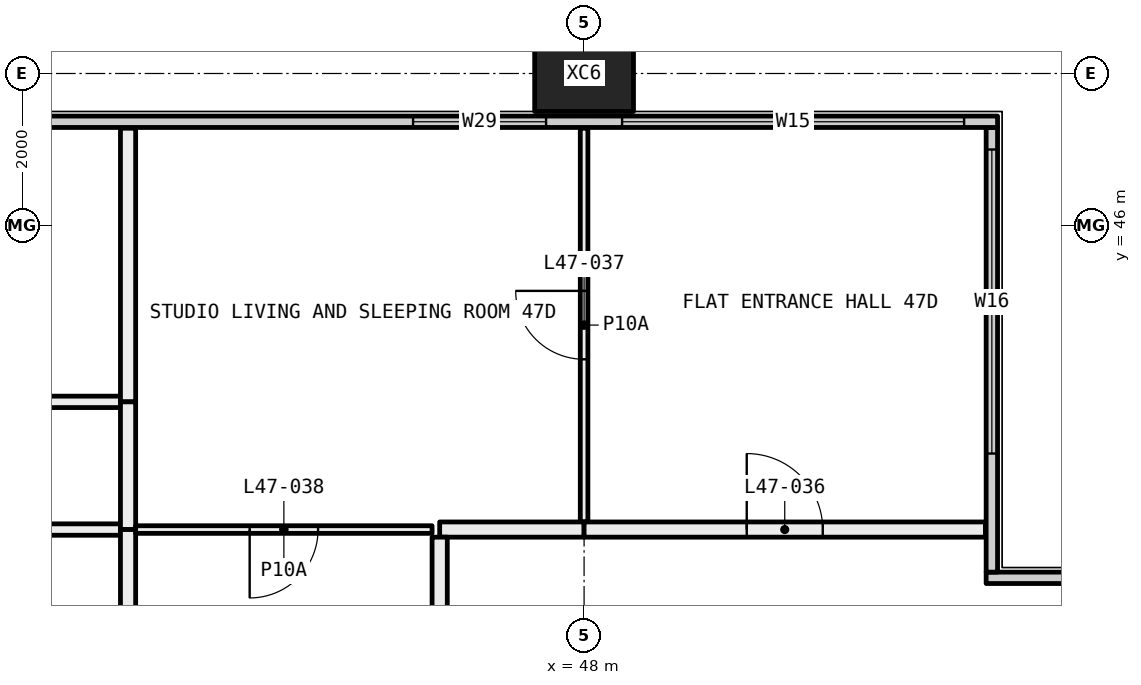
"""IFC4 building model, lengths in metres.
Left out: names, types, materials, properties, quantities, classifications, styles, units other than length and angle.
Written with IfcOpenShell. Run it as: python <this file> out.ifc"""

import sys

from ifc_helpers import new_model, si_unit, direction, frame, frame_2d, origin, origin_2d, place, context, subcontext, project, spatial, rectangle, hollow_rectangle, extrude, element, fill, save


model = new_model("IFC4")
c1 = context("Model", 3, precision=1e-05, world=origin(), true_north=direction((0.0, 1.0)))
c2 = subcontext(c1, "Body", "Model", "MODEL_VIEW")
j1 = project(units=[si_unit("LENGTHUNIT", "METRE"), si_unit("PLANEANGLEUNIT", "RADIAN")], contexts=[c1])
p1 = place(None, origin())
s1 = spatial("IfcSite", under=j1, at=p1, CompositionType="ELEMENT")
p2 = place(p1, origin())
s2 = spatial("IfcBuilding", under=s1, at=p2, CompositionType="ELEMENT")
p3 = place(p2, frame((0.0, 0.0, 178.95)))
s3 = spatial("IfcBuildingStorey", under=s2, at=p3, CompositionType="ELEMENT", Elevation=178.95)
p4 = place(p3, frame((48.0, 48.0, -0.4), z_axis=(0.0, 0.0, 1.0), x_axis=(1.0, 0.0, 0.0)))
e1 = element("IfcColumn", 1, at=p4, inside=s3, PredefinedType="COLUMN", context=c2, shape_type="SweptSolid", body=[
    extrude(hollow_rectangle(XDim=1.3, YDim=1.0, WallThickness=0.05, at=origin_2d()), origin(), (0.0, 0.0, 1.0), 3.45),
])
p5 = place(p3, frame((53.29, 41.365, 0.0), z_axis=(0.0, 0.0, 1.0), x_axis=(1.0, 0.0, 0.0)))
e2 = element("IfcWall", 2, at=p5, inside=s3, PredefinedType="ELEMENTEDWALL", context=c2, shape_type="SweptSolid", body=[
    extrude(rectangle(XDim=6.15, YDim=0.15, at=frame_2d((3.075, 0.0))), origin(), (0.0, 0.0, 1.0), 3.05),
])
p6 = place(p5, frame((1.71, 0.0, 0.45)))
e3 = element("IfcOpeningElement", 3, at=p6, cuts=e2, PredefinedType="OPENING", context=c2, shape_type="SweptSolid", body=[
    extrude(rectangle(XDim=4.0, YDim=2.55, at=frame_2d((2.0, 1.275))), frame((0.0, 0.085, 0.0), z_axis=(0.0, -1.0, 0.0), x_axis=(1.0, 0.0, 0.0)), (0.0, 0.0, 1.0), 0.17),
])
p7 = place(p3, frame((53.365, 41.44, 0.0), z_axis=(0.0, 0.0, 1.0), x_axis=(0.0, 1.0, 0.0)))
e4 = element("IfcWall", 4, at=p7, inside=s3, PredefinedType="ELEMENTEDWALL", context=c2, shape_type="SweptSolid", body=[
    extrude(rectangle(XDim=5.85, YDim=0.15, at=frame_2d((2.925, 0.0))), origin(), (0.0, 0.0, 1.0), 3.05),
])
p8 = place(p7, frame((1.56, 0.0, 0.45)))
e5 = element("IfcOpeningElement", 5, at=p8, cuts=e4, PredefinedType="OPENING", context=c2, shape_type="SweptSolid", body=[
    extrude(rectangle(XDim=4.0, YDim=2.55, at=frame_2d((2.0, 1.275))), frame((0.0, 0.085, 0.0), z_axis=(0.0, -1.0, 0.0), x_axis=(1.0, 0.0, 0.0)), (0.0, 0.0, 1.0), 0.17),
])
p9 = place(p3, frame((6.56, 47.365, 0.0), z_axis=(0.0, 0.0, 1.0), x_axis=(1.0, 0.0, 0.0)))
e6 = element("IfcWall", 6, at=p9, inside=s3, PredefinedType="ELEMENTEDWALL", context=c2, shape_type="SweptSolid", body=[
    extrude(rectangle(XDim=46.88, YDim=0.15, at=frame_2d((23.44, 0.0))), origin(), (0.0, 0.0, 1.0), 3.05),
])
p10 = place(p9, frame((0.44, 0.0, 0.45)))
e7 = element("IfcOpeningElement", 7, at=p10, cuts=e6, PredefinedType="OPENING", context=c2, shape_type="SweptSolid", body=[
    extrude(rectangle(XDim=4.5, YDim=2.55, at=frame_2d((2.25, 1.275))), frame((0.0, 0.085, 0.0), z_axis=(0.0, -1.0, 0.0), x_axis=(1.0, 0.0, 0.0)), (0.0, 0.0, 1.0), 0.17),
])
p11 = place(p9, frame((5.94, 0.0, 0.45)))
e8 = element("IfcOpeningElement", 8, at=p11, cuts=e6, PredefinedType="OPENING", context=c2, shape_type="SweptSolid", body=[
    extrude(rectangle(XDim=1.75, YDim=2.55, at=frame_2d((0.875, 1.275))), frame((0.0, 0.085, 0.0), z_axis=(0.0, -1.0, 0.0), x_axis=(1.0, 0.0, 0.0)), (0.0, 0.0, 1.0), 0.17),
])
p12 = place(p9, frame((15.19, 0.0, 0.45)))
e9 = element("IfcOpeningElement", 9, at=p12, cuts=e6, PredefinedType="OPENING", context=c2, shape_type="SweptSolid", body=[
    extrude(rectangle(XDim=1.75, YDim=2.55, at=frame_2d((0.875, 1.275))), frame((0.0, 0.085, 0.0), z_axis=(0.0, -1.0, 0.0), x_axis=(1.0, 0.0, 0.0)), (0.0, 0.0, 1.0), 0.17),
])
p13 = place(p9, frame((17.94, 0.0, 0.45)))
e10 = element("IfcOpeningElement", 10, at=p13, cuts=e6, PredefinedType="OPENING", context=c2, shape_type="SweptSolid", body=[
    extrude(rectangle(XDim=1.75, YDim=2.55, at=frame_2d((0.875, 1.275))), frame((0.0, 0.085, 0.0), z_axis=(0.0, -1.0, 0.0), x_axis=(1.0, 0.0, 0.0)), (0.0, 0.0, 1.0), 0.17),
])
p14 = place(p9, frame((27.19, 0.0, 0.45)))
e11 = element("IfcOpeningElement", 11, at=p14, cuts=e6, PredefinedType="OPENING", context=c2, shape_type="SweptSolid", body=[
    extrude(rectangle(XDim=1.75, YDim=2.55, at=frame_2d((0.875, 1.275))), frame((0.0, 0.085, 0.0), z_axis=(0.0, -1.0, 0.0), x_axis=(1.0, 0.0, 0.0)), (0.0, 0.0, 1.0), 0.17),
])
p15 = place(p9, frame((29.94, 0.0, 0.45)))
e12 = element("IfcOpeningElement", 12, at=p15, cuts=e6, PredefinedType="OPENING", context=c2, shape_type="SweptSolid", body=[
    extrude(rectangle(XDim=1.75, YDim=2.55, at=frame_2d((0.875, 1.275))), frame((0.0, 0.085, 0.0), z_axis=(0.0, -1.0, 0.0), x_axis=(1.0, 0.0, 0.0)), (0.0, 0.0, 1.0), 0.17),
])
p16 = place(p9, frame((39.19, 0.0, 0.45)))
e13 = element("IfcOpeningElement", 13, at=p16, cuts=e6, PredefinedType="OPENING", context=c2, shape_type="SweptSolid", body=[
    extrude(rectangle(XDim=1.75, YDim=2.55, at=frame_2d((0.875, 1.275))), frame((0.0, 0.085, 0.0), z_axis=(0.0, -1.0, 0.0), x_axis=(1.0, 0.0, 0.0)), (0.0, 0.0, 1.0), 0.17),
])
p17 = place(p9, frame((41.94, 0.0, 0.45)))
e14 = element("IfcOpeningElement", 14, at=p17, cuts=e6, PredefinedType="OPENING", context=c2, shape_type="SweptSolid", body=[
    extrude(rectangle(XDim=4.5, YDim=2.55, at=frame_2d((2.25, 1.275))), frame((0.0, 0.085, 0.0), z_axis=(0.0, -1.0, 0.0), x_axis=(1.0, 0.0, 0.0)), (0.0, 0.0, 1.0), 0.17),
])
p18 = place(p3, frame((36.075, 43.68, 0.0), z_axis=(0.0, 0.0, 1.0), x_axis=(1.0, 0.0, 0.0)))
e15 = element("IfcWall", 15, at=p18, inside=s3, PredefinedType="PARTITIONING", context=c2, shape_type="SweptSolid", body=[
    extrude(rectangle(XDim=5.825, YDim=0.15, at=frame_2d((2.913, 0.0))), origin(), (0.0, 0.0, 1.0), 2.45),
])
p19 = place(p3, frame((42.0, 43.68, 0.0), z_axis=(0.0, 0.0, 1.0), x_axis=(0.0, 1.0, 0.0)))
e16 = element("IfcWall", 16, at=p19, inside=s3, PredefinedType="PARTITIONING", context=c2, shape_type="SweptSolid", body=[
    extrude(rectangle(XDim=3.6, YDim=0.2, at=frame_2d((1.8, 0.0))), origin(), (0.0, 0.0, 1.0), 3.05),
])
p20 = place(p3, frame((36.075, 42.0, 0.0), z_axis=(0.0, 0.0, 1.0), x_axis=(1.0, 0.0, 0.0)))
e17 = element("IfcWall", 17, at=p20, inside=s3, PredefinedType="PARTITIONING", context=c2, shape_type="SweptSolid", body=[
    extrude(rectangle(XDim=5.825, YDim=0.15, at=frame_2d((2.913, 0.0))), origin(), (0.0, 0.0, 1.0), 2.45),
])
p21 = place(p3, frame((42.0, 42.0, 0.0), z_axis=(0.0, 0.0, 1.0), x_axis=(0.0, 1.0, 0.0)))
e18 = element("IfcWall", 18, at=p21, inside=s3, PredefinedType="PARTITIONING", context=c2, shape_type="SweptSolid", body=[
    extrude(rectangle(XDim=1.68, YDim=0.2, at=frame_2d((0.84, 0.0))), origin(), (0.0, 0.0, 1.0), 3.05),
])
p22 = place(p3, frame((42.0, 36.1, 0.0), z_axis=(0.0, 0.0, 1.0), x_axis=(0.0, 1.0, 0.0)))
e19 = element("IfcWall", 19, at=p22, inside=s3, PredefinedType="PARTITIONING", context=c2, shape_type="SweptSolid", body=[
    extrude(rectangle(XDim=5.9, YDim=0.2, at=frame_2d((2.95, 0.0))), origin(), (0.0, 0.0, 1.0), 3.05),
])
p23 = place(p3, frame((48.0, 42.1, 0.0), z_axis=(0.0, 0.0, 1.0), x_axis=(0.0, 1.0, 0.0)))
e20 = element("IfcWall", 20, at=p23, inside=s3, PredefinedType="PARTITIONING", context=c2, shape_type="SweptSolid", body=[
    extrude(rectangle(XDim=5.18, YDim=0.1, at=frame_2d((2.59, 0.0))), origin(), (0.0, 0.0, 1.0), 3.05),
])
p24 = place(p23, frame((2.14, 0.0, 0.0)))
e21 = element("IfcOpeningElement", 21, at=p24, cuts=e20, PredefinedType="OPENING", context=c2, shape_type="SweptSolid", body=[
    extrude(rectangle(XDim=0.9, YDim=2.1, at=frame_2d((0.45, 1.05))), frame((0.0, 0.06, 0.0), z_axis=(0.0, -1.0, 0.0), x_axis=(1.0, 0.0, 0.0)), (0.0, 0.0, 1.0), 0.12),
])
p25 = place(p3, frame((42.1, 42.0, 0.0), z_axis=(0.0, 0.0, 1.0), x_axis=(1.0, 0.0, 0.0)))
e22 = element("IfcWall", 22, at=p25, inside=s3, PredefinedType="PARTITIONING", context=c2, shape_type="SweptSolid", body=[
    extrude(rectangle(XDim=3.9, YDim=0.1, at=frame_2d((1.95, 0.0))), origin(), (0.0, 0.0, 1.0), 3.05),
])
p26 = place(p25, frame((1.5, 0.0, 0.0)))
e23 = element("IfcOpeningElement", 23, at=p26, cuts=e22, PredefinedType="OPENING", context=c2, shape_type="SweptSolid", body=[
    extrude(rectangle(XDim=0.9, YDim=2.1, at=frame_2d((0.45, 1.05))), frame((0.0, 0.06, 0.0), z_axis=(0.0, -1.0, 0.0), x_axis=(1.0, 0.0, 0.0)), (0.0, 0.0, 1.0), 0.12),
])
p27 = place(p3, frame((46.1, 42.0, 0.0), z_axis=(0.0, 0.0, 1.0), x_axis=(1.0, 0.0, 0.0)))
e24 = element("IfcWall", 24, at=p27, inside=s3, PredefinedType="PARTITIONING", context=c2, shape_type="SweptSolid", body=[
    extrude(rectangle(XDim=1.9, YDim=0.2, at=frame_2d((0.95, 0.0))), origin(), (0.0, 0.0, 1.0), 3.05),
])
p28 = place(p3, frame((48.0, 42.0, 0.0), z_axis=(0.0, 0.0, 1.0), x_axis=(1.0, 0.0, 0.0)))
e25 = element("IfcWall", 25, at=p28, inside=s3, PredefinedType="PARTITIONING", context=c2, shape_type="SweptSolid", body=[
    extrude(rectangle(XDim=5.28, YDim=0.2, at=frame_2d((2.64, 0.0))), origin(), (0.0, 0.0, 1.0), 3.05),
])
p29 = place(p28, frame((2.14, 0.0, 0.0)))
e26 = element("IfcOpeningElement", 26, at=p29, cuts=e25, PredefinedType="OPENING", context=c2, shape_type="SweptSolid", body=[
    extrude(rectangle(XDim=1.0, YDim=2.1, at=frame_2d((0.5, 1.05))), frame((0.0, 0.11, 0.0), z_axis=(0.0, -1.0, 0.0), x_axis=(1.0, 0.0, 0.0)), (0.0, 0.0, 1.0), 0.22),
])
p30 = place(p3, frame((46.1, 36.1, 0.0), z_axis=(0.0, 0.0, 1.0), x_axis=(0.0, 1.0, 0.0)))
e27 = element("IfcWall", 27, at=p30, inside=s3, PredefinedType="PARTITIONING", context=c2, shape_type="SweptSolid", body=[
    extrude(rectangle(XDim=5.8, YDim=0.2, at=frame_2d((2.9, 0.0))), origin(), (0.0, 0.0, 1.0), 3.05),
])
p31 = place(p8, origin())
e28 = element("IfcWindow", 28, at=p31, inside=s3, PartitioningType="SINGLE_PANEL", PredefinedType="WINDOW", context=c2, shape_type="SweptSolid", body=[
    extrude(rectangle(XDim=4.0, YDim=2.55, at=frame_2d((2.0, 1.275))), frame((0.0, 0.03, 0.0), z_axis=(0.0, -1.0, 0.0), x_axis=(1.0, 0.0, 0.0)), (0.0, 0.0, 1.0), 0.06),
])
fill(e5, e28)
p32 = place(p16, origin())
e29 = element("IfcWindow", 29, at=p32, inside=s3, PartitioningType="SINGLE_PANEL", PredefinedType="WINDOW", context=c2, shape_type="SweptSolid", body=[
    extrude(rectangle(XDim=1.75, YDim=2.55, at=frame_2d((0.875, 1.275))), frame((0.0, 0.03, 0.0), z_axis=(0.0, -1.0, 0.0), x_axis=(1.0, 0.0, 0.0)), (0.0, 0.0, 1.0), 0.06),
])
fill(e13, e29)
p33 = place(p17, origin())
e30 = element("IfcWindow", 30, at=p33, inside=s3, PartitioningType="SINGLE_PANEL", PredefinedType="WINDOW", context=c2, shape_type="SweptSolid", body=[
    extrude(rectangle(XDim=4.5, YDim=2.55, at=frame_2d((2.25, 1.275))), frame((0.0, 0.03, 0.0), z_axis=(0.0, -1.0, 0.0), x_axis=(1.0, 0.0, 0.0)), (0.0, 0.0, 1.0), 0.06),
])
fill(e14, e30)
p34 = place(p29, origin())
e31 = element("IfcDoor", 31, at=p34, inside=s3, OperationType="SINGLE_SWING_RIGHT", PredefinedType="DOOR", context=c2, shape_type="SweptSolid", body=[
    extrude(rectangle(XDim=1.0, YDim=2.1, at=frame_2d((0.5, 1.05))), frame((0.0, 0.025, 0.0), z_axis=(0.0, -1.0, 0.0), x_axis=(1.0, 0.0, 0.0)), (0.0, 0.0, 1.0), 0.05),
])
fill(e26, e31)
p35 = place(p24, origin())
e32 = element("IfcDoor", 32, at=p35, inside=s3, OperationType="SINGLE_SWING_LEFT", PredefinedType="DOOR", context=c2, shape_type="SweptSolid", body=[
    extrude(rectangle(XDim=0.9, YDim=2.1, at=frame_2d((0.45, 1.05))), frame((0.0, 0.025, 0.0), z_axis=(0.0, -1.0, 0.0), x_axis=(1.0, 0.0, 0.0)), (0.0, 0.0, 1.0), 0.05),
])
fill(e21, e32)
p36 = place(p26, frame((0.9, 0.0, 0.0), x_axis=(-1.0, 0.0, 0.0)))
e33 = element("IfcDoor", 33, at=p36, inside=s3, OperationType="SINGLE_SWING_LEFT", PredefinedType="DOOR", context=c2, shape_type="SweptSolid", body=[
    extrude(rectangle(XDim=0.9, YDim=2.1, at=frame_2d((0.45, 1.05))), frame((0.0, 0.025, 0.0), z_axis=(0.0, -1.0, 0.0), x_axis=(1.0, 0.0, 0.0)), (0.0, 0.0, 1.0), 0.05),
])
fill(e23, e33)
save(model, sys.argv[1])
